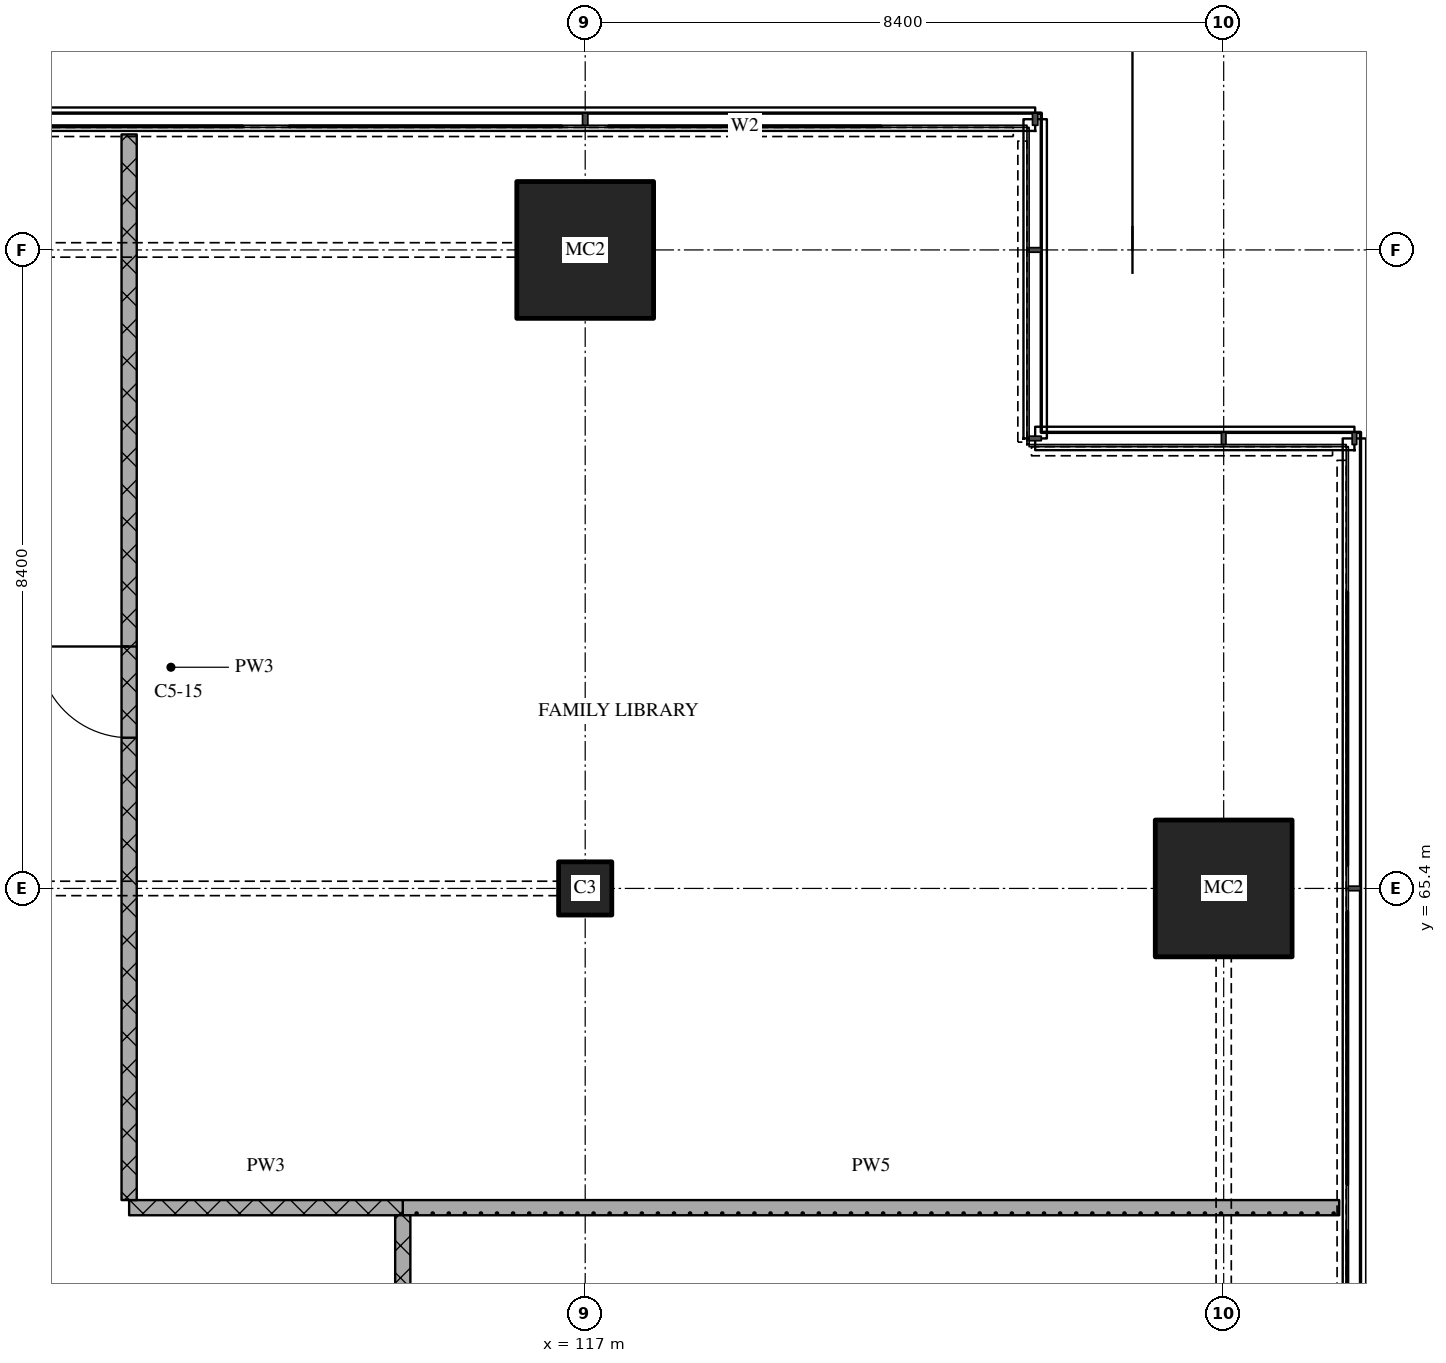
"""IFC4 building model, lengths in metres.
Left out: names, types, materials, properties, quantities, classifications, styles, units other than length and angle.
Written with IfcOpenShell. Run it as: python <this file> out.ifc"""

import sys

from ifc_helpers import new_model, si_unit, direction, frame, frame_2d, origin, origin_2d, place, context, subcontext, project, spatial, rectangle, extrude, element, fill, save


model = new_model("IFC4")
c1 = context("Model", 3, precision=1e-05, world=origin(), true_north=direction((0.0, 1.0)))
c2 = subcontext(c1, "Body", "Model", "MODEL_VIEW")
j1 = project(units=[si_unit("LENGTHUNIT", "METRE"), si_unit("PLANEANGLEUNIT", "RADIAN")], contexts=[c1])
p1 = place(None, origin())
s1 = spatial("IfcSite", under=j1, at=p1, CompositionType="ELEMENT")
p2 = place(p1, origin())
s2 = spatial("IfcBuilding", under=s1, at=p2, CompositionType="ELEMENT")
p3 = place(p2, frame((0.0, 0.0, 190.65)))
s3 = spatial("IfcBuildingStorey", under=s2, at=p3, CompositionType="ELEMENT", Elevation=190.65)
p4 = place(p3, frame((117.0, 65.4, 0.0), z_axis=(0.0, 0.0, 1.0), x_axis=(1.0, 0.0, 0.0)))
e1 = element("IfcColumn", 1, at=p4, inside=s3, PredefinedType="COLUMN", context=c2, shape_type="SweptSolid", body=[
    extrude(rectangle(XDim=0.7, YDim=0.7, at=origin_2d()), origin(), (0.0, 0.0, 1.0), 3.6),
])
for number, where, z_axis, x_axis in (
    (2, (117.0, 73.8, 0.0), (0.0, 0.0, 1.0), (1.0, 0.0, 0.0)),
    (3, (125.4, 65.4, 0.0), (0.0, 0.0, 1.0), (1.0, 0.0, 0.0)),
):
    element("IfcColumn", number, at=place(p3, frame(where, z_axis=z_axis, x_axis=x_axis)), inside=s3, PredefinedType="COLUMN", context=c2, shape_type="SweptSolid", body=[
        extrude(rectangle(XDim=1.8, YDim=1.8, at=origin_2d()), origin(), (0.0, 0.0, 1.0), 3.6),
    ])
p5 = place(p3, frame((111.0, 61.2, 0.0), z_axis=(0.0, 0.0, 1.0), x_axis=(1.0, 0.0, 0.0)))
e4 = element("IfcWall", 4, at=p5, inside=s3, PredefinedType="PARTITIONING", context=c2, shape_type="SweptSolid", body=[
    extrude(rectangle(XDim=3.6, YDim=0.2, at=frame_2d((1.8, 0.0))), origin(), (0.0, 0.0, 1.0), 3.3),
])
p6 = place(p3, frame((114.6, 61.2, 0.0), z_axis=(0.0, 0.0, 1.0), x_axis=(1.0, 0.0, 0.0)))
e5 = element("IfcWall", 5, at=p6, inside=s3, PredefinedType="PARTITIONING", context=c2, shape_type="SweptSolid", body=[
    extrude(rectangle(XDim=12.32, YDim=0.2, at=frame_2d((6.16, 0.0))), origin(), (0.0, 0.0, 1.0), 3.3),
])
p7 = place(p3, frame((111.0, 75.32, 0.0), z_axis=(0.0, 0.0, 1.0), x_axis=(0.0, -1.0, 0.0)))
e6 = element("IfcWall", 6, at=p7, inside=s3, PredefinedType="PARTITIONING", context=c2, shape_type="SweptSolid", body=[
    extrude(rectangle(XDim=14.02, YDim=0.2, at=frame_2d((7.01, 0.0))), origin(), (0.0, 0.0, 1.0), 3.3),
])
p8 = place(p7, frame((6.737, 0.0, 0.0)))
e7 = element("IfcOpeningElement", 7, at=p8, cuts=e6, PredefinedType="OPENING", context=c2, shape_type="SweptSolid", body=[
    extrude(rectangle(XDim=1.2, YDim=2.1, at=frame_2d((0.6, 1.05))), frame((0.0, 0.11, 0.0), z_axis=(0.0, -1.0, 0.0), x_axis=(1.0, 0.0, 0.0)), (0.0, 0.0, 1.0), 0.22),
])
p9 = place(p3, frame((114.6, 61.1, 0.0), z_axis=(0.0, 0.0, 1.0), x_axis=(0.0, -1.0, 0.0)))
e8 = element("IfcWall", 8, at=p9, inside=s3, PredefinedType="PARTITIONING", context=c2, shape_type="SweptSolid", body=[
    extrude(rectangle(XDim=17.8, YDim=0.2, at=frame_2d((8.9, 0.0))), origin(), (0.0, 0.0, 1.0), 3.3),
])
p10 = place(p9, frame((0.95, 0.0, 0.0)))
e9 = element("IfcOpeningElement", 9, at=p10, cuts=e8, PredefinedType="OPENING", context=c2, shape_type="SweptSolid", body=[
    extrude(rectangle(XDim=1.2, YDim=2.1, at=frame_2d((0.6, 1.05))), frame((0.0, 0.11, 0.0), z_axis=(0.0, -1.0, 0.0), x_axis=(1.0, 0.0, 0.0)), (0.0, 0.0, 1.0), 0.22),
])
p11 = place(p8, origin())
e10 = element("IfcDoor", 10, at=p11, inside=s3, OperationType="SINGLE_SWING_RIGHT", PredefinedType="DOOR", context=c2, shape_type="SweptSolid", body=[
    extrude(rectangle(XDim=1.2, YDim=2.1, at=frame_2d((0.6, 1.05))), frame((0.0, 0.025, 0.0), z_axis=(0.0, -1.0, 0.0), x_axis=(1.0, 0.0, 0.0)), (0.0, 0.0, 1.0), 0.05),
])
fill(e7, e10)
save(model, sys.argv[1])
